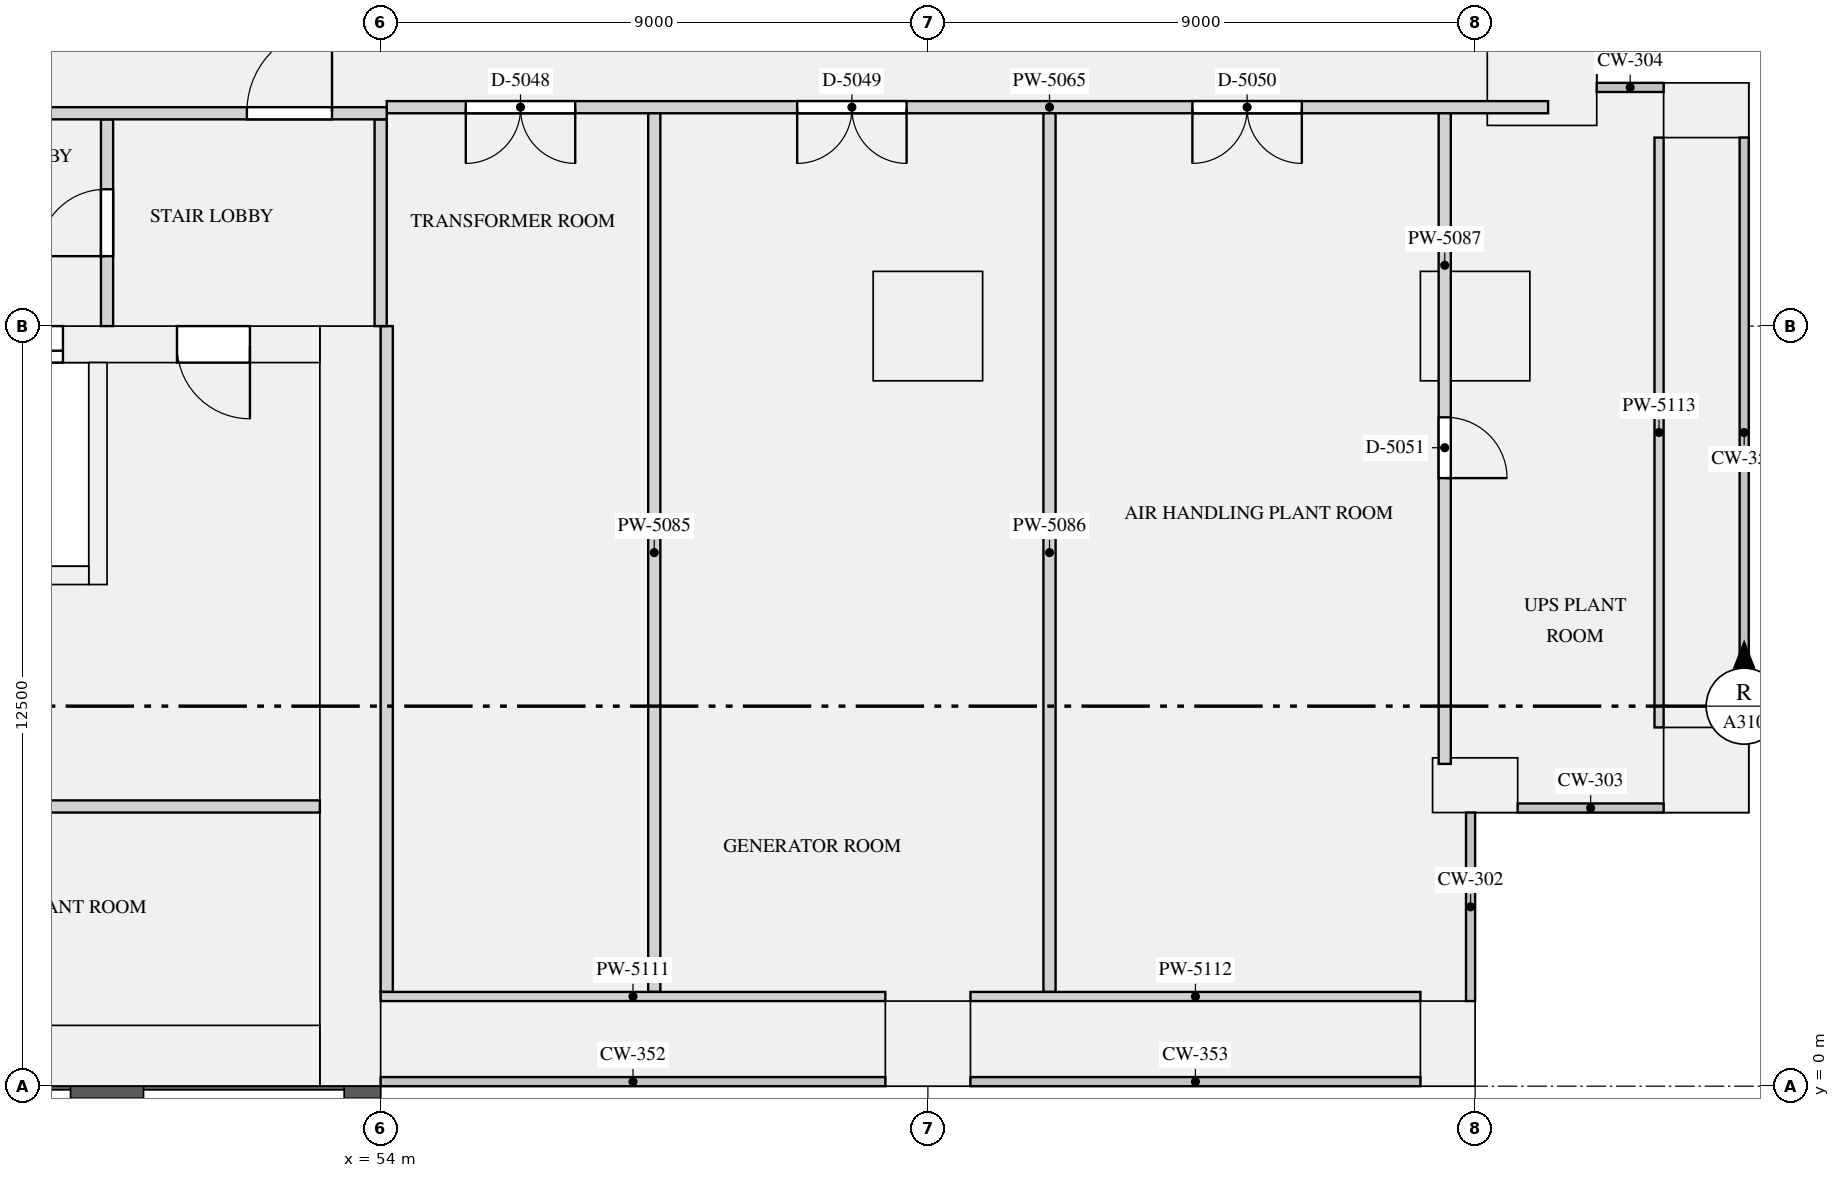
"""IFC4 building model, lengths in metres.
Left out: names, types, materials, properties, quantities, classifications, styles, units other than length and angle.
Written with IfcOpenShell. Run it as: python <this file> out.ifc"""

import sys

from ifc_helpers import new_model, si_unit, direction, frame, frame_2d, origin, origin_2d, place, context, subcontext, project, spatial, rectangle, extrude, element, fill, save


model = new_model("IFC4")
c1 = context("Model", 3, precision=1e-05, world=origin(), true_north=direction((0.0, 1.0)))
c2 = subcontext(c1, "Body", "Model", "MODEL_VIEW")
j1 = project(units=[si_unit("LENGTHUNIT", "METRE"), si_unit("PLANEANGLEUNIT", "RADIAN")], contexts=[c1])
p1 = place(None, origin())
s1 = spatial("IfcSite", under=j1, at=p1, CompositionType="ELEMENT")
p2 = place(p1, origin())
s2 = spatial("IfcBuilding", under=s1, at=p2, CompositionType="ELEMENT")
p3 = place(p2, frame((0.0, 0.0, 15.5)))
s3 = spatial("IfcBuildingStorey", under=s2, at=p3, CompositionType="ELEMENT", Elevation=15.5)
p4 = place(p3, frame((63.0, 0.7, 0.0), z_axis=(0.0, 0.0, 1.0), x_axis=(1.0, 0.0, 0.0)))
e1 = element("IfcColumn", 1, at=p4, inside=s3, PredefinedType="USERDEFINED", context=c2, shape_type="SweptSolid", body=[
    extrude(rectangle(XDim=1.4, YDim=1.4, at=origin_2d()), origin(), (0.0, 0.0, 1.0), 4.0),
])
for number, where, z_axis, x_axis in (
    (2, (71.55, 0.7, 0.0), (0.0, 0.0, 1.0), (0.0, 1.0, 0.0)),
    (3, (72.0, 4.95, 0.0), (0.0, 0.0, 1.0), (1.0, 0.0, 0.0)),
):
    element("IfcColumn", number, at=place(p3, frame(where, z_axis=z_axis, x_axis=x_axis)), inside=s3, PredefinedType="USERDEFINED", context=c2, shape_type="SweptSolid", body=[
        extrude(rectangle(XDim=1.4, YDim=0.9, at=origin_2d()), origin(), (0.0, 0.0, 1.0), 4.0),
    ])
p5 = place(p3, frame((75.8, 5.2, 0.0), z_axis=(0.0, 0.0, 1.0), x_axis=(0.0, 1.0, 0.0)))
e4 = element("IfcColumn", 4, at=p5, inside=s3, PredefinedType="USERDEFINED", context=c2, shape_type="SweptSolid", body=[
    extrude(rectangle(XDim=1.4, YDim=1.4, at=origin_2d()), origin(), (0.0, 0.0, 1.0), 4.0),
])
p6 = place(p3, frame((75.8, 16.05, 0.0), z_axis=(0.0, 0.0, 1.0), x_axis=(-1.0, 0.0, 0.0)))
e5 = element("IfcColumn", 5, at=p6, inside=s3, PredefinedType="USERDEFINED", context=c2, shape_type="SweptSolid", body=[
    extrude(rectangle(XDim=1.4, YDim=0.9, at=origin_2d()), origin(), (0.0, 0.0, 1.0), 4.0),
])
p7 = place(p3, frame((73.1, 16.5, 0.0), z_axis=(0.0, 0.0, 1.0), x_axis=(0.0, 1.0, 0.0)))
e6 = element("IfcColumn", 6, at=p7, inside=s3, PredefinedType="USERDEFINED", context=c2, shape_type="SweptSolid", body=[
    extrude(rectangle(XDim=1.4, YDim=1.8, at=origin_2d()), origin(), (0.0, 0.0, 1.0), 4.0),
])
for number, where, z_axis, x_axis in (
    (7, (63.0, 12.5, 0.0), (0.0, 0.0, 1.0), (1.0, 0.0, 0.0)),
    (8, (72.0, 12.5, 0.0), (0.0, 0.0, 1.0), (1.0, 0.0, 0.0)),
):
    element("IfcColumn", number, at=place(p3, frame(where, z_axis=z_axis, x_axis=x_axis)), inside=s3, PredefinedType="COLUMN", context=c2, shape_type="SweptSolid", body=[
        extrude(rectangle(XDim=1.8, YDim=1.8, at=origin_2d()), origin(), (0.0, 0.0, 1.0), 4.0),
    ])
p8 = place(p3, frame((53.5, 0.0, 0.0), z_axis=(0.0, 0.0, 1.0), x_axis=(0.0, 1.0, 0.0)))
e9 = element("IfcWall", 9, at=p8, inside=s3, PredefinedType="SHEAR", context=c2, shape_type="SweptSolid", body=[
    extrude(rectangle(XDim=12.5, YDim=1.0, at=frame_2d((6.25, 0.0))), origin(), (0.0, 0.0, 1.0), 4.0),
])
p9 = place(p3, frame((19.0, 0.5, 0.0), z_axis=(0.0, 0.0, 1.0), x_axis=(1.0, 0.0, 0.0)))
e10 = element("IfcWall", 10, at=p9, inside=s3, PredefinedType="SHEAR", context=c2, shape_type="SweptSolid", body=[
    extrude(rectangle(XDim=34.0, YDim=1.0, at=frame_2d((17.0, 0.0))), origin(), (0.0, 0.0, 1.0), 4.0),
])
p10 = place(p3, frame((19.0, 12.2, 0.0), z_axis=(0.0, 0.0, 1.0), x_axis=(1.0, 0.0, 0.0)))
e11 = element("IfcWall", 11, at=p10, inside=s3, PredefinedType="SHEAR", context=c2, shape_type="SweptSolid", body=[
    extrude(rectangle(XDim=34.0, YDim=0.6, at=frame_2d((17.0, 0.0))), origin(), (0.0, 0.0, 1.0), 4.0),
])
p11 = place(p10, frame((4.475, 0.0, 0.0)))
e12 = element("IfcOpeningElement", 12, at=p11, cuts=e11, PredefinedType="OPENING", context=c2, shape_type="SweptSolid", body=[
    extrude(rectangle(XDim=1.2, YDim=2.1, at=frame_2d((0.6, 1.05))), frame((0.0, 0.31, 0.0), z_axis=(0.0, -1.0, 0.0), x_axis=(1.0, 0.0, 0.0)), (0.0, 0.0, 1.0), 0.62),
])
p12 = place(p10, frame((7.325, 0.0, 0.0)))
e13 = element("IfcOpeningElement", 13, at=p12, cuts=e11, PredefinedType="OPENING", context=c2, shape_type="SweptSolid", body=[
    extrude(rectangle(XDim=1.2, YDim=2.1, at=frame_2d((0.6, 1.05))), frame((0.0, 0.31, 0.0), z_axis=(0.0, -1.0, 0.0), x_axis=(1.0, 0.0, 0.0)), (0.0, 0.0, 1.0), 0.62),
])
p13 = place(p10, frame((10.175, 0.0, 0.0)))
e14 = element("IfcOpeningElement", 14, at=p13, cuts=e11, PredefinedType="OPENING", context=c2, shape_type="SweptSolid", body=[
    extrude(rectangle(XDim=1.2, YDim=2.1, at=frame_2d((0.6, 1.05))), frame((0.0, 0.31, 0.0), z_axis=(0.0, -1.0, 0.0), x_axis=(1.0, 0.0, 0.0)), (0.0, 0.0, 1.0), 0.62),
])
p14 = place(p10, frame((13.025, 0.0, 0.0)))
e15 = element("IfcOpeningElement", 15, at=p14, cuts=e11, PredefinedType="OPENING", context=c2, shape_type="SweptSolid", body=[
    extrude(rectangle(XDim=1.2, YDim=2.1, at=frame_2d((0.6, 1.05))), frame((0.0, 0.31, 0.0), z_axis=(0.0, -1.0, 0.0), x_axis=(1.0, 0.0, 0.0)), (0.0, 0.0, 1.0), 0.62),
])
p15 = place(p10, frame((15.875, 0.0, 0.0)))
e16 = element("IfcOpeningElement", 16, at=p15, cuts=e11, PredefinedType="OPENING", context=c2, shape_type="SweptSolid", body=[
    extrude(rectangle(XDim=1.2, YDim=2.1, at=frame_2d((0.6, 1.05))), frame((0.0, 0.31, 0.0), z_axis=(0.0, -1.0, 0.0), x_axis=(1.0, 0.0, 0.0)), (0.0, 0.0, 1.0), 0.62),
])
p16 = place(p10, frame((24.175, 0.0, 0.0)))
e17 = element("IfcOpeningElement", 17, at=p16, cuts=e11, PredefinedType="OPENING", context=c2, shape_type="SweptSolid", body=[
    extrude(rectangle(XDim=1.1, YDim=2.1, at=frame_2d((0.55, 1.05))), frame((0.0, 0.31, 0.0), z_axis=(0.0, -1.0, 0.0), x_axis=(1.0, 0.0, 0.0)), (0.0, 0.0, 1.0), 0.62),
])
p17 = place(p10, frame((26.425, 0.0, 0.0)))
e18 = element("IfcOpeningElement", 18, at=p17, cuts=e11, PredefinedType="OPENING", context=c2, shape_type="SweptSolid", body=[
    extrude(rectangle(XDim=1.1, YDim=2.1, at=frame_2d((0.55, 1.05))), frame((0.0, 0.31, 0.0), z_axis=(0.0, -1.0, 0.0), x_axis=(1.0, 0.0, 0.0)), (0.0, 0.0, 1.0), 0.62),
])
p18 = place(p10, frame((28.675, 0.0, 0.0)))
e19 = element("IfcOpeningElement", 19, at=p18, cuts=e11, PredefinedType="OPENING", context=c2, shape_type="SweptSolid", body=[
    extrude(rectangle(XDim=1.1, YDim=2.1, at=frame_2d((0.55, 1.05))), frame((0.0, 0.31, 0.0), z_axis=(0.0, -1.0, 0.0), x_axis=(1.0, 0.0, 0.0)), (0.0, 0.0, 1.0), 0.62),
])
p19 = place(p10, frame((1.15, 0.0, 0.0)))
e20 = element("IfcOpeningElement", 20, at=p19, cuts=e11, PredefinedType="OPENING", context=c2, shape_type="SweptSolid", body=[
    extrude(rectangle(XDim=1.2, YDim=2.1, at=frame_2d((0.6, 1.05))), frame((0.0, 0.31, 0.0), z_axis=(0.0, -1.0, 0.0), x_axis=(1.0, 0.0, 0.0)), (0.0, 0.0, 1.0), 0.62),
])
p20 = place(p10, frame((31.65, 0.0, 0.0)))
e21 = element("IfcOpeningElement", 21, at=p20, cuts=e11, PredefinedType="OPENING", context=c2, shape_type="SweptSolid", body=[
    extrude(rectangle(XDim=1.2, YDim=2.1, at=frame_2d((0.6, 1.05))), frame((0.0, 0.31, 0.0), z_axis=(0.0, -1.0, 0.0), x_axis=(1.0, 0.0, 0.0)), (0.0, 0.0, 1.0), 0.62),
])
p21 = place(p3, frame((47.25, 8.4, 0.0), z_axis=(0.0, 0.0, 1.0), x_axis=(1.0, 0.0, 0.0)))
e22 = element("IfcWall", 22, at=p21, inside=s3, PredefinedType="SHEAR", context=c2, shape_type="SweptSolid", body=[
    extrude(rectangle(XDim=1.95, YDim=0.3, at=frame_2d((0.975, 0.0))), origin(), (0.0, 0.0, 1.0), 4.0),
])
p22 = place(p3, frame((49.35, 8.25, 0.0), z_axis=(0.0, 0.0, 1.0), x_axis=(0.0, 1.0, 0.0)))
e23 = element("IfcWall", 23, at=p22, inside=s3, PredefinedType="SHEAR", context=c2, shape_type="SweptSolid", body=[
    extrude(rectangle(XDim=3.65, YDim=0.3, at=frame_2d((1.825, 0.0))), origin(), (0.0, 0.0, 1.0), 4.0),
])
p23 = place(p3, frame((40.2, 4.6, 0.0), z_axis=(0.0, 0.0, 1.0), x_axis=(1.0, 0.0, 0.0)))
e24 = element("IfcWall", 24, at=p23, inside=s3, PredefinedType="PARTITIONING", context=c2, shape_type="SweptSolid", body=[
    extrude(rectangle(XDim=12.8, YDim=0.2, at=frame_2d((6.4, 0.0))), origin(), (0.0, 0.0, 1.0), 3.68),
])
p24 = place(p23, frame((4.85, 0.0, 0.0)))
e25 = element("IfcOpeningElement", 25, at=p24, cuts=e24, PredefinedType="OPENING", context=c2, shape_type="SweptSolid", body=[
    extrude(rectangle(XDim=0.9, YDim=2.1, at=frame_2d((0.45, 1.05))), frame((0.0, 0.11, 0.0), z_axis=(0.0, -1.0, 0.0), x_axis=(1.0, 0.0, 0.0)), (0.0, 0.0, 1.0), 0.22),
])
p25 = place(p23, frame((0.65, 0.0, 0.0)))
e26 = element("IfcOpeningElement", 26, at=p25, cuts=e24, PredefinedType="OPENING", context=c2, shape_type="SweptSolid", body=[
    extrude(rectangle(XDim=0.9, YDim=2.1, at=frame_2d((0.45, 1.05))), frame((0.0, 0.11, 0.0), z_axis=(0.0, -1.0, 0.0), x_axis=(1.0, 0.0, 0.0)), (0.0, 0.0, 1.0), 0.22),
])
p26 = place(p23, frame((2.85, 0.0, 0.0)))
e27 = element("IfcOpeningElement", 27, at=p26, cuts=e24, PredefinedType="OPENING", context=c2, shape_type="SweptSolid", body=[
    extrude(rectangle(XDim=0.9, YDim=2.1, at=frame_2d((0.45, 1.05))), frame((0.0, 0.11, 0.0), z_axis=(0.0, -1.0, 0.0), x_axis=(1.0, 0.0, 0.0)), (0.0, 0.0, 1.0), 0.22),
])
p27 = place(p3, frame((49.5, 12.5, 0.0), z_axis=(0.0, 0.0, 1.0), x_axis=(0.0, 1.0, 0.0)))
e28 = element("IfcWall", 28, at=p27, inside=s3, PredefinedType="PARTITIONING", context=c2, shape_type="SweptSolid", body=[
    extrude(rectangle(XDim=3.4, YDim=0.2, at=frame_2d((1.7, 0.0))), origin(), (0.0, 0.0, 1.0), 3.68),
])
p28 = place(p27, frame((1.15, 0.0, 0.0)))
e29 = element("IfcOpeningElement", 29, at=p28, cuts=e28, PredefinedType="OPENING", context=c2, shape_type="SweptSolid", body=[
    extrude(rectangle(XDim=1.1, YDim=2.1, at=frame_2d((0.55, 1.05))), frame((0.0, 0.11, 0.0), z_axis=(0.0, -1.0, 0.0), x_axis=(1.0, 0.0, 0.0)), (0.0, 0.0, 1.0), 0.22),
])
p29 = place(p3, frame((54.0, 12.5, 0.0), z_axis=(0.0, 0.0, 1.0), x_axis=(0.0, 1.0, 0.0)))
e30 = element("IfcWall", 30, at=p29, inside=s3, PredefinedType="PARTITIONING", context=c2, shape_type="SweptSolid", body=[
    extrude(rectangle(XDim=3.4, YDim=0.2, at=frame_2d((1.7, 0.0))), origin(), (0.0, 0.0, 1.0), 3.68),
])
p30 = place(p3, frame((17.9, 16.0, 0.0), z_axis=(0.0, 0.0, 1.0), x_axis=(1.0, 0.0, 0.0)))
e31 = element("IfcWall", 31, at=p30, inside=s3, PredefinedType="PARTITIONING", context=c2, shape_type="SweptSolid", body=[
    extrude(rectangle(XDim=36.2, YDim=0.2, at=frame_2d((18.1, 0.0))), origin(), (0.0, 0.0, 1.0), 3.68),
])
p31 = place(p30, frame((0.9, 0.0, 0.0)))
e32 = element("IfcOpeningElement", 32, at=p31, cuts=e31, PredefinedType="OPENING", context=c2, shape_type="SweptSolid", body=[
    extrude(rectangle(XDim=1.4, YDim=2.1, at=frame_2d((0.7, 1.05))), frame((0.0, 0.11, 0.0), z_axis=(0.0, -1.0, 0.0), x_axis=(1.0, 0.0, 0.0)), (0.0, 0.0, 1.0), 0.22),
])
p32 = place(p30, frame((33.9, 0.0, 0.0)))
e33 = element("IfcOpeningElement", 33, at=p32, cuts=e31, PredefinedType="OPENING", context=c2, shape_type="SweptSolid", body=[
    extrude(rectangle(XDim=1.4, YDim=2.1, at=frame_2d((0.7, 1.05))), frame((0.0, 0.11, 0.0), z_axis=(0.0, -1.0, 0.0), x_axis=(1.0, 0.0, 0.0)), (0.0, 0.0, 1.0), 0.22),
])
p33 = place(p3, frame((54.1, 16.1, 0.0), z_axis=(0.0, 0.0, 1.0), x_axis=(1.0, 0.0, 0.0)))
e34 = element("IfcWall", 34, at=p33, inside=s3, PredefinedType="PARTITIONING", context=c2, shape_type="SweptSolid", body=[
    extrude(rectangle(XDim=19.1, YDim=0.2, at=frame_2d((9.55, 0.0))), origin(), (0.0, 0.0, 1.0), 3.68),
])
p34 = place(p33, frame((1.3, 0.0, 0.0)))
e35 = element("IfcOpeningElement", 35, at=p34, cuts=e34, PredefinedType="OPENING", context=c2, shape_type="SweptSolid", body=[
    extrude(rectangle(XDim=1.8, YDim=2.1, at=frame_2d((0.9, 1.05))), frame((0.0, 0.11, 0.0), z_axis=(0.0, -1.0, 0.0), x_axis=(1.0, 0.0, 0.0)), (0.0, 0.0, 1.0), 0.22),
])
p35 = place(p33, frame((6.75, 0.0, 0.0)))
e36 = element("IfcOpeningElement", 36, at=p35, cuts=e34, PredefinedType="OPENING", context=c2, shape_type="SweptSolid", body=[
    extrude(rectangle(XDim=1.8, YDim=2.1, at=frame_2d((0.9, 1.05))), frame((0.0, 0.11, 0.0), z_axis=(0.0, -1.0, 0.0), x_axis=(1.0, 0.0, 0.0)), (0.0, 0.0, 1.0), 0.22),
])
p36 = place(p33, frame((13.25, 0.0, 0.0)))
e37 = element("IfcOpeningElement", 37, at=p36, cuts=e34, PredefinedType="OPENING", context=c2, shape_type="SweptSolid", body=[
    extrude(rectangle(XDim=1.8, YDim=2.1, at=frame_2d((0.9, 1.05))), frame((0.0, 0.11, 0.0), z_axis=(0.0, -1.0, 0.0), x_axis=(1.0, 0.0, 0.0)), (0.0, 0.0, 1.0), 0.22),
])
p37 = place(p3, frame((54.1, 1.55, 0.0), z_axis=(0.0, 0.0, 1.0), x_axis=(0.0, 1.0, 0.0)))
e38 = element("IfcWall", 38, at=p37, inside=s3, PredefinedType="PARTITIONING", context=c2, shape_type="SweptSolid", body=[
    extrude(rectangle(XDim=10.95, YDim=0.2, at=frame_2d((5.475, 0.0))), origin(), (0.0, 0.0, 1.0), 3.68),
])
for number, where, z_axis, x_axis in (
    (39, (58.5, 1.55, 0.0), (0.0, 0.0, 1.0), (0.0, 1.0, 0.0)),
    (40, (65.0, 1.55, 0.0), (0.0, 0.0, 1.0), (0.0, 1.0, 0.0)),
):
    element("IfcWall", number, at=place(p3, frame(where, z_axis=z_axis, x_axis=x_axis)), inside=s3, PredefinedType="PARTITIONING", context=c2, shape_type="SweptSolid", body=[
        extrude(rectangle(XDim=14.45, YDim=0.2, at=frame_2d((7.225, 0.0))), origin(), (0.0, 0.0, 1.0), 3.68),
    ])
p38 = place(p3, frame((71.5, 5.3, 0.0), z_axis=(0.0, 0.0, 1.0), x_axis=(0.0, 1.0, 0.0)))
e41 = element("IfcWall", 41, at=p38, inside=s3, PredefinedType="PARTITIONING", context=c2, shape_type="SweptSolid", body=[
    extrude(rectangle(XDim=10.7, YDim=0.2, at=frame_2d((5.35, 0.0))), origin(), (0.0, 0.0, 1.0), 3.68),
])
p39 = place(p38, frame((4.7, 0.0, 0.0)))
e42 = element("IfcOpeningElement", 42, at=p39, cuts=e41, PredefinedType="OPENING", context=c2, shape_type="SweptSolid", body=[
    extrude(rectangle(XDim=1.0, YDim=2.1, at=frame_2d((0.5, 1.05))), frame((0.0, 0.11, 0.0), z_axis=(0.0, -1.0, 0.0), x_axis=(1.0, 0.0, 0.0)), (0.0, 0.0, 1.0), 0.22),
])
p40 = place(p3, frame((54.0, 1.475, 0.0), z_axis=(0.0, 0.0, 1.0), x_axis=(1.0, 0.0, 0.0)))
e43 = element("IfcWall", 43, at=p40, inside=s3, PredefinedType="PARTITIONING", context=c2, shape_type="SweptSolid", body=[
    extrude(rectangle(XDim=8.3, YDim=0.15, at=frame_2d((4.15, 0.0))), origin(), (0.0, 0.0, 1.0), 3.68),
])
p41 = place(p3, frame((63.7, 1.475, 0.0), z_axis=(0.0, 0.0, 1.0), x_axis=(1.0, 0.0, 0.0)))
e44 = element("IfcWall", 44, at=p41, inside=s3, PredefinedType="PARTITIONING", context=c2, shape_type="SweptSolid", body=[
    extrude(rectangle(XDim=7.4, YDim=0.15, at=frame_2d((3.7, 0.0))), origin(), (0.0, 0.0, 1.0), 3.68),
])
p42 = place(p3, frame((75.025, 5.9, 0.0), z_axis=(0.0, 0.0, 1.0), x_axis=(0.0, 1.0, 0.0)))
e45 = element("IfcWall", 45, at=p42, inside=s3, PredefinedType="PARTITIONING", context=c2, shape_type="SweptSolid", body=[
    extrude(rectangle(XDim=9.7, YDim=0.15, at=frame_2d((4.85, 0.0))), origin(), (0.0, 0.0, 1.0), 3.68),
])
p43 = place(p18, origin())
e46 = element("IfcDoor", 46, at=p43, inside=s3, OperationType="DOUBLE_DOOR_SLIDING", PredefinedType="DOOR", context=c2, shape_type="SweptSolid", body=[
    extrude(rectangle(XDim=1.1, YDim=2.1, at=frame_2d((0.55, 1.05))), frame((0.0, 0.025, 0.0), z_axis=(0.0, -1.0, 0.0), x_axis=(1.0, 0.0, 0.0)), (0.0, 0.0, 1.0), 0.05),
])
fill(e19, e46)
p44 = place(p20, frame((1.2, 0.0, 0.0), z_axis=(0.0, 0.0, 1.0), x_axis=(-1.0, 0.0, 0.0)))
e47 = element("IfcDoor", 47, at=p44, inside=s3, OperationType="SINGLE_SWING_LEFT", PredefinedType="DOOR", context=c2, shape_type="SweptSolid", body=[
    extrude(rectangle(XDim=1.2, YDim=2.1, at=frame_2d((0.6, 1.05))), frame((0.0, 0.025, 0.0), z_axis=(0.0, -1.0, 0.0), x_axis=(1.0, 0.0, 0.0)), (0.0, 0.0, 1.0), 0.05),
])
fill(e21, e47)
p45 = place(p28, origin())
e48 = element("IfcDoor", 48, at=p45, inside=s3, OperationType="SINGLE_SWING_LEFT", PredefinedType="DOOR", context=c2, shape_type="SweptSolid", body=[
    extrude(rectangle(XDim=1.1, YDim=2.1, at=frame_2d((0.55, 1.05))), frame((0.0, 0.025, 0.0), z_axis=(0.0, -1.0, 0.0), x_axis=(1.0, 0.0, 0.0)), (0.0, 0.0, 1.0), 0.05),
])
fill(e29, e48)
p46 = place(p32, origin())
e49 = element("IfcDoor", 49, at=p46, inside=s3, OperationType="SINGLE_SWING_RIGHT", PredefinedType="DOOR", context=c2, shape_type="SweptSolid", body=[
    extrude(rectangle(XDim=1.4, YDim=2.1, at=frame_2d((0.7, 1.05))), frame((0.0, 0.025, 0.0), z_axis=(0.0, -1.0, 0.0), x_axis=(1.0, 0.0, 0.0)), (0.0, 0.0, 1.0), 0.05),
])
fill(e33, e49)
p47 = place(p34, frame((1.8, 0.0, 0.0), z_axis=(0.0, 0.0, 1.0), x_axis=(-1.0, 0.0, 0.0)))
e50 = element("IfcDoor", 50, at=p47, inside=s3, OperationType="DOUBLE_DOOR_SINGLE_SWING", PredefinedType="DOOR", context=c2, shape_type="SweptSolid", body=[
    extrude(rectangle(XDim=1.8, YDim=2.1, at=frame_2d((0.9, 1.05))), frame((0.0, 0.025, 0.0), z_axis=(0.0, -1.0, 0.0), x_axis=(1.0, 0.0, 0.0)), (0.0, 0.0, 1.0), 0.05),
])
fill(e35, e50)
p48 = place(p35, frame((1.8, 0.0, 0.0), z_axis=(0.0, 0.0, 1.0), x_axis=(-1.0, 0.0, 0.0)))
e51 = element("IfcDoor", 51, at=p48, inside=s3, OperationType="DOUBLE_DOOR_SINGLE_SWING", PredefinedType="DOOR", context=c2, shape_type="SweptSolid", body=[
    extrude(rectangle(XDim=1.8, YDim=2.1, at=frame_2d((0.9, 1.05))), frame((0.0, 0.025, 0.0), z_axis=(0.0, -1.0, 0.0), x_axis=(1.0, 0.0, 0.0)), (0.0, 0.0, 1.0), 0.05),
])
fill(e36, e51)
p49 = place(p36, frame((1.8, 0.0, 0.0), z_axis=(0.0, 0.0, 1.0), x_axis=(-1.0, 0.0, 0.0)))
e52 = element("IfcDoor", 52, at=p49, inside=s3, OperationType="DOUBLE_DOOR_SINGLE_SWING", PredefinedType="DOOR", context=c2, shape_type="SweptSolid", body=[
    extrude(rectangle(XDim=1.8, YDim=2.1, at=frame_2d((0.9, 1.05))), frame((0.0, 0.025, 0.0), z_axis=(0.0, -1.0, 0.0), x_axis=(1.0, 0.0, 0.0)), (0.0, 0.0, 1.0), 0.05),
])
fill(e37, e52)
p50 = place(p39, frame((1.0, 0.0, 0.0), z_axis=(0.0, 0.0, 1.0), x_axis=(-1.0, 0.0, 0.0)))
e53 = element("IfcDoor", 53, at=p50, inside=s3, OperationType="SINGLE_SWING_RIGHT", PredefinedType="DOOR", context=c2, shape_type="SweptSolid", body=[
    extrude(rectangle(XDim=1.0, YDim=2.1, at=frame_2d((0.5, 1.05))), frame((0.0, 0.025, 0.0), z_axis=(0.0, -1.0, 0.0), x_axis=(1.0, 0.0, 0.0)), (0.0, 0.0, 1.0), 0.05),
])
fill(e42, e53)
save(model, sys.argv[1])
